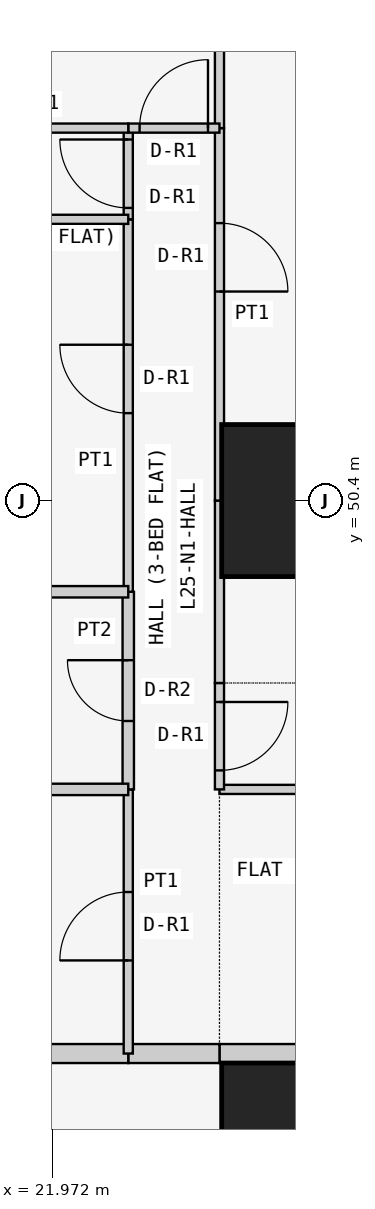
"""IFC4 building model, lengths in metres.
Left out: names, types, materials, properties, quantities, classifications, styles, units other than length and angle.
Written with IfcOpenShell. Run it as: python <this file> out.ifc"""

import sys

from ifc_helpers import new_model, si_unit, direction, frame, frame_2d, origin, origin_2d, place, context, subcontext, project, spatial, rectangle, extrude, element, fill, save


model = new_model("IFC4")
c1 = context("Model", 3, precision=1e-05, world=origin(), true_north=direction((0.0, 1.0)))
c2 = subcontext(c1, "Body", "Model", "MODEL_VIEW")
j1 = project(units=[si_unit("LENGTHUNIT", "METRE"), si_unit("PLANEANGLEUNIT", "RADIAN")], contexts=[c1])
p1 = place(None, origin())
s1 = spatial("IfcSite", under=j1, at=p1, CompositionType="ELEMENT")
p2 = place(p1, origin())
s2 = spatial("IfcBuilding", under=s1, at=p2, CompositionType="ELEMENT")
p3 = place(p2, frame((0.0, 0.0, 99.3)))
s3 = spatial("IfcBuildingStorey", under=s2, at=p3, CompositionType="ELEMENT", Elevation=99.3)
for number, where, z_axis, x_axis in (
    (1, (25.2, 42.0, 0.0), (0.0, 0.0, 1.0), (1.0, 0.0, 0.0)),
    (2, (25.2, 50.4, 0.0), (0.0, 0.0, 1.0), (1.0, 0.0, 0.0)),
):
    element("IfcColumn", number, at=place(p3, frame(where, z_axis=z_axis, x_axis=x_axis)), inside=s3, PredefinedType="COLUMN", context=c2, shape_type="SweptSolid", body=[
        extrude(rectangle(XDim=2.0, YDim=2.0, at=origin_2d()), origin(), (0.0, 0.0, 1.0), 3.6),
    ])
p4 = place(p3, frame((24.171, 43.125, 0.0), z_axis=(0.0, 0.0, 1.0), x_axis=(1.0, 0.0, 0.0)))
e3 = element("IfcWall", 3, at=p4, inside=s3, PredefinedType="PARTITIONING", context=c2, shape_type="SweptSolid", body=[
    extrude(rectangle(XDim=5.229, YDim=0.25, at=frame_2d((2.615, 0.0))), origin(), (0.0, 0.0, 1.0), 3.35),
])
p5 = place(p4, frame((2.179, 0.0, 0.0)))
e4 = element("IfcOpeningElement", 4, at=p5, cuts=e3, PredefinedType="OPENING", context=c2, shape_type="SweptSolid", body=[
    extrude(rectangle(XDim=1.0, YDim=2.1, at=frame_2d((0.5, 1.05))), frame((0.0, 0.135, 0.0), z_axis=(0.0, -1.0, 0.0), x_axis=(1.0, 0.0, 0.0)), (0.0, 0.0, 1.0), 0.27),
])
p6 = place(p3, frame((22.971, 43.125, 0.0), z_axis=(0.0, 0.0, 1.0), x_axis=(1.0, 0.0, 0.0)))
e5 = element("IfcWall", 5, at=p6, inside=s3, PredefinedType="PARTITIONING", context=c2, shape_type="SweptSolid", body=[
    extrude(rectangle(XDim=1.2, YDim=0.25, at=frame_2d((0.6, 0.0))), origin(), (0.0, 0.0, 1.0), 3.35),
])
p7 = place(p3, frame((16.1, 43.125, 0.0), z_axis=(0.0, 0.0, 1.0), x_axis=(1.0, 0.0, 0.0)))
e6 = element("IfcWall", 6, at=p7, inside=s3, PredefinedType="PARTITIONING", context=c2, shape_type="SweptSolid", body=[
    extrude(rectangle(XDim=6.871, YDim=0.25, at=frame_2d((3.436, 0.0))), origin(), (0.0, 0.0, 1.0), 3.35),
])
p8 = place(p3, frame((29.4, 46.6, 0.0), z_axis=(0.0, 0.0, 1.0), x_axis=(-1.0, 0.0, 0.0)))
e7 = element("IfcWall", 7, at=p8, inside=s3, PredefinedType="PARTITIONING", context=c2, shape_type="SweptSolid", body=[
    extrude(rectangle(XDim=5.229, YDim=0.12, at=frame_2d((2.615, 0.0))), origin(), (0.0, 0.0, 1.0), 3.35),
])
p9 = place(p3, frame((24.171, 48.0, 0.0), z_axis=(0.0, 0.0, 1.0), x_axis=(0.0, -1.0, 0.0)))
e8 = element("IfcWall", 8, at=p9, inside=s3, PredefinedType="PARTITIONING", context=c2, shape_type="SweptSolid", body=[
    extrude(rectangle(XDim=1.4, YDim=0.12, at=frame_2d((0.7, 0.0))), origin(), (0.0, 0.0, 1.0), 3.35),
])
p10 = place(p9, frame((0.25, 0.0, 0.0)))
e9 = element("IfcOpeningElement", 9, at=p10, cuts=e8, PredefinedType="OPENING", context=c2, shape_type="SweptSolid", body=[
    extrude(rectangle(XDim=0.9, YDim=2.1, at=frame_2d((0.45, 1.05))), frame((0.0, 0.07, 0.0), z_axis=(0.0, -1.0, 0.0), x_axis=(1.0, 0.0, 0.0)), (0.0, 0.0, 1.0), 0.14),
])
p11 = place(p3, frame((24.171, 50.4, 0.0), z_axis=(0.0, 0.0, 1.0), x_axis=(0.0, -1.0, 0.0)))
e10 = element("IfcWall", 10, at=p11, inside=s3, PredefinedType="PARTITIONING", context=c2, shape_type="SweptSolid", body=[
    extrude(rectangle(XDim=2.4, YDim=0.12, at=frame_2d((1.2, 0.0))), origin(), (0.0, 0.0, 1.0), 3.35),
])
p12 = place(p3, frame((24.171, 55.3, 0.0), z_axis=(0.0, 0.0, 1.0), x_axis=(0.0, -1.0, 0.0)))
e11 = element("IfcWall", 11, at=p12, inside=s3, PredefinedType="PARTITIONING", context=c2, shape_type="SweptSolid", body=[
    extrude(rectangle(XDim=4.9, YDim=0.12, at=frame_2d((2.45, 0.0))), origin(), (0.0, 0.0, 1.0), 3.35),
])
p13 = place(p12, frame((1.25, 0.0, 0.0)))
e12 = element("IfcOpeningElement", 12, at=p13, cuts=e11, PredefinedType="OPENING", context=c2, shape_type="SweptSolid", body=[
    extrude(rectangle(XDim=0.9, YDim=2.1, at=frame_2d((0.45, 1.05))), frame((0.0, 0.07, 0.0), z_axis=(0.0, -1.0, 0.0), x_axis=(1.0, 0.0, 0.0)), (0.0, 0.0, 1.0), 0.14),
])
p14 = place(p3, frame((24.171, 59.45, 0.0), z_axis=(0.0, 0.0, 1.0), x_axis=(0.0, -1.0, 0.0)))
e13 = element("IfcWall", 13, at=p14, inside=s3, PredefinedType="PARTITIONING", context=c2, shape_type="SweptSolid", body=[
    extrude(rectangle(XDim=4.15, YDim=0.12, at=frame_2d((2.075, 0.0))), origin(), (0.0, 0.0, 1.0), 3.35),
])
p15 = place(p3, frame((22.971, 46.6, 0.0), z_axis=(0.0, 0.0, 1.0), x_axis=(0.0, -1.0, 0.0)))
e14 = element("IfcWall", 14, at=p15, inside=s3, PredefinedType="PARTITIONING", context=c2, shape_type="SweptSolid", body=[
    extrude(rectangle(XDim=3.475, YDim=0.12, at=frame_2d((1.738, 0.0))), origin(), (0.0, 0.0, 1.0), 3.35),
])
p16 = place(p15, frame((1.35, 0.0, 0.0)))
e15 = element("IfcOpeningElement", 15, at=p16, cuts=e14, PredefinedType="OPENING", context=c2, shape_type="SweptSolid", body=[
    extrude(rectangle(XDim=0.9, YDim=2.1, at=frame_2d((0.45, 1.05))), frame((0.0, 0.07, 0.0), z_axis=(0.0, -1.0, 0.0), x_axis=(1.0, 0.0, 0.0)), (0.0, 0.0, 1.0), 0.14),
])
p17 = place(p3, frame((22.971, 49.2, 0.0), z_axis=(0.0, 0.0, 1.0), x_axis=(0.0, -1.0, 0.0)))
e16 = element("IfcWall", 16, at=p17, inside=s3, PredefinedType="PARTITIONING", context=c2, shape_type="SweptSolid", body=[
    extrude(rectangle(XDim=2.6, YDim=0.15, at=frame_2d((1.3, 0.0))), origin(), (0.0, 0.0, 1.0), 3.35),
])
p18 = place(p17, frame((0.9, 0.0, 0.0)))
e17 = element("IfcOpeningElement", 17, at=p18, cuts=e16, PredefinedType="OPENING", context=c2, shape_type="SweptSolid", body=[
    extrude(rectangle(XDim=0.8, YDim=2.1, at=frame_2d((0.4, 1.05))), frame((0.0, 0.085, 0.0), z_axis=(0.0, -1.0, 0.0), x_axis=(1.0, 0.0, 0.0)), (0.0, 0.0, 1.0), 0.17),
])
p19 = place(p3, frame((22.971, 54.1, 0.0), z_axis=(0.0, 0.0, 1.0), x_axis=(0.0, -1.0, 0.0)))
e18 = element("IfcWall", 18, at=p19, inside=s3, PredefinedType="PARTITIONING", context=c2, shape_type="SweptSolid", body=[
    extrude(rectangle(XDim=4.9, YDim=0.12, at=frame_2d((2.45, 0.0))), origin(), (0.0, 0.0, 1.0), 3.35),
])
p20 = place(p19, frame((1.65, 0.0, 0.0)))
e19 = element("IfcOpeningElement", 19, at=p20, cuts=e18, PredefinedType="OPENING", context=c2, shape_type="SweptSolid", body=[
    extrude(rectangle(XDim=0.9, YDim=2.1, at=frame_2d((0.45, 1.05))), frame((0.0, 0.07, 0.0), z_axis=(0.0, -1.0, 0.0), x_axis=(1.0, 0.0, 0.0)), (0.0, 0.0, 1.0), 0.14),
])
p21 = place(p3, frame((22.971, 55.3, 0.0), z_axis=(0.0, 0.0, 1.0), x_axis=(0.0, -1.0, 0.0)))
e20 = element("IfcWall", 20, at=p21, inside=s3, PredefinedType="PARTITIONING", context=c2, shape_type="SweptSolid", body=[
    extrude(rectangle(XDim=1.2, YDim=0.12, at=frame_2d((0.6, 0.0))), origin(), (0.0, 0.0, 1.0), 3.35),
])
p22 = place(p21, frame((0.15, 0.0, 0.0)))
e21 = element("IfcOpeningElement", 21, at=p22, cuts=e20, PredefinedType="OPENING", context=c2, shape_type="SweptSolid", body=[
    extrude(rectangle(XDim=0.9, YDim=2.1, at=frame_2d((0.45, 1.05))), frame((0.0, 0.07, 0.0), z_axis=(0.0, -1.0, 0.0), x_axis=(1.0, 0.0, 0.0)), (0.0, 0.0, 1.0), 0.14),
])
p23 = place(p3, frame((24.171, 55.3, 0.0), z_axis=(0.0, 0.0, 1.0), x_axis=(-1.0, 0.0, 0.0)))
e22 = element("IfcWall", 22, at=p23, inside=s3, PredefinedType="PARTITIONING", context=c2, shape_type="SweptSolid", body=[
    extrude(rectangle(XDim=1.2, YDim=0.12, at=frame_2d((0.6, 0.0))), origin(), (0.0, 0.0, 1.0), 3.35),
])
p24 = place(p23, frame((0.151, 0.0, 0.0)))
e23 = element("IfcOpeningElement", 23, at=p24, cuts=e22, PredefinedType="OPENING", context=c2, shape_type="SweptSolid", body=[
    extrude(rectangle(XDim=0.9, YDim=2.1, at=frame_2d((0.45, 1.05))), frame((0.0, 0.07, 0.0), z_axis=(0.0, -1.0, 0.0), x_axis=(1.0, 0.0, 0.0)), (0.0, 0.0, 1.0), 0.14),
])
for number, where, z_axis, x_axis in (
    (24, (22.971, 46.6, 0.0), (0.0, 0.0, 1.0), (-1.0, 0.0, 0.0)),
    (25, (22.971, 49.2, 0.0), (0.0, 0.0, 1.0), (-1.0, 0.0, 0.0)),
):
    element("IfcWall", number, at=place(p3, frame(where, z_axis=z_axis, x_axis=x_axis)), inside=s3, PredefinedType="PARTITIONING", context=c2, shape_type="SweptSolid", body=[
        extrude(rectangle(XDim=2.971, YDim=0.15, at=frame_2d((1.485, 0.0))), origin(), (0.0, 0.0, 1.0), 3.35),
    ])
for number, where, z_axis, x_axis in (
    (26, (22.971, 54.1, 0.0), (0.0, 0.0, 1.0), (-1.0, 0.0, 0.0)),
    (27, (22.971, 55.3, 0.0), (0.0, 0.0, 1.0), (-1.0, 0.0, 0.0)),
):
    element("IfcWall", number, at=place(p3, frame(where, z_axis=z_axis, x_axis=x_axis)), inside=s3, PredefinedType="PARTITIONING", context=c2, shape_type="SweptSolid", body=[
        extrude(rectangle(XDim=2.285, YDim=0.12, at=frame_2d((1.143, 0.0))), origin(), (0.0, 0.0, 1.0), 3.35),
    ])
p25 = place(p10, origin())
e28 = element("IfcDoor", 28, at=p25, inside=s3, OperationType="SINGLE_SWING_LEFT", PredefinedType="DOOR", context=c2, shape_type="SweptSolid", body=[
    extrude(rectangle(XDim=0.9, YDim=2.1, at=frame_2d((0.45, 1.05))), frame((0.0, 0.025, 0.0), z_axis=(0.0, -1.0, 0.0), x_axis=(1.0, 0.0, 0.0)), (0.0, 0.0, 1.0), 0.05),
])
fill(e9, e28)
p26 = place(p13, origin())
e29 = element("IfcDoor", 29, at=p26, inside=s3, OperationType="SINGLE_SWING_RIGHT", PredefinedType="DOOR", context=c2, shape_type="SweptSolid", body=[
    extrude(rectangle(XDim=0.9, YDim=2.1, at=frame_2d((0.45, 1.05))), frame((0.0, 0.025, 0.0), z_axis=(0.0, -1.0, 0.0), x_axis=(1.0, 0.0, 0.0)), (0.0, 0.0, 1.0), 0.05),
])
fill(e12, e29)
p27 = place(p16, frame((0.9, 0.0, 0.0), z_axis=(0.0, 0.0, 1.0), x_axis=(-1.0, 0.0, 0.0)))
e30 = element("IfcDoor", 30, at=p27, inside=s3, OperationType="SINGLE_SWING_LEFT", PredefinedType="DOOR", context=c2, shape_type="SweptSolid", body=[
    extrude(rectangle(XDim=0.9, YDim=2.1, at=frame_2d((0.45, 1.05))), frame((0.0, 0.025, 0.0), z_axis=(0.0, -1.0, 0.0), x_axis=(1.0, 0.0, 0.0)), (0.0, 0.0, 1.0), 0.05),
])
fill(e15, e30)
p28 = place(p18, frame((0.8, 0.0, 0.0), z_axis=(0.0, 0.0, 1.0), x_axis=(-1.0, 0.0, 0.0)))
e31 = element("IfcDoor", 31, at=p28, inside=s3, OperationType="SINGLE_SWING_RIGHT", PredefinedType="DOOR", context=c2, shape_type="SweptSolid", body=[
    extrude(rectangle(XDim=0.8, YDim=2.1, at=frame_2d((0.4, 1.05))), frame((0.0, 0.025, 0.0), z_axis=(0.0, -1.0, 0.0), x_axis=(1.0, 0.0, 0.0)), (0.0, 0.0, 1.0), 0.05),
])
fill(e17, e31)
p29 = place(p20, frame((0.9, 0.0, 0.0), z_axis=(0.0, 0.0, 1.0), x_axis=(-1.0, 0.0, 0.0)))
e32 = element("IfcDoor", 32, at=p29, inside=s3, OperationType="SINGLE_SWING_RIGHT", PredefinedType="DOOR", context=c2, shape_type="SweptSolid", body=[
    extrude(rectangle(XDim=0.9, YDim=2.1, at=frame_2d((0.45, 1.05))), frame((0.0, 0.025, 0.0), z_axis=(0.0, -1.0, 0.0), x_axis=(1.0, 0.0, 0.0)), (0.0, 0.0, 1.0), 0.05),
])
fill(e19, e32)
p30 = place(p22, frame((0.9, 0.0, 0.0), z_axis=(0.0, 0.0, 1.0), x_axis=(-1.0, 0.0, 0.0)))
e33 = element("IfcDoor", 33, at=p30, inside=s3, OperationType="SINGLE_SWING_RIGHT", PredefinedType="DOOR", context=c2, shape_type="SweptSolid", body=[
    extrude(rectangle(XDim=0.9, YDim=2.1, at=frame_2d((0.45, 1.05))), frame((0.0, 0.025, 0.0), z_axis=(0.0, -1.0, 0.0), x_axis=(1.0, 0.0, 0.0)), (0.0, 0.0, 1.0), 0.05),
])
fill(e21, e33)
p31 = place(p24, frame((0.9, 0.0, 0.0), z_axis=(0.0, 0.0, 1.0), x_axis=(-1.0, 0.0, 0.0)))
e34 = element("IfcDoor", 34, at=p31, inside=s3, OperationType="SINGLE_SWING_RIGHT", PredefinedType="DOOR", context=c2, shape_type="SweptSolid", body=[
    extrude(rectangle(XDim=0.9, YDim=2.1, at=frame_2d((0.45, 1.05))), frame((0.0, 0.025, 0.0), z_axis=(0.0, -1.0, 0.0), x_axis=(1.0, 0.0, 0.0)), (0.0, 0.0, 1.0), 0.05),
])
fill(e23, e34)
save(model, sys.argv[1])
